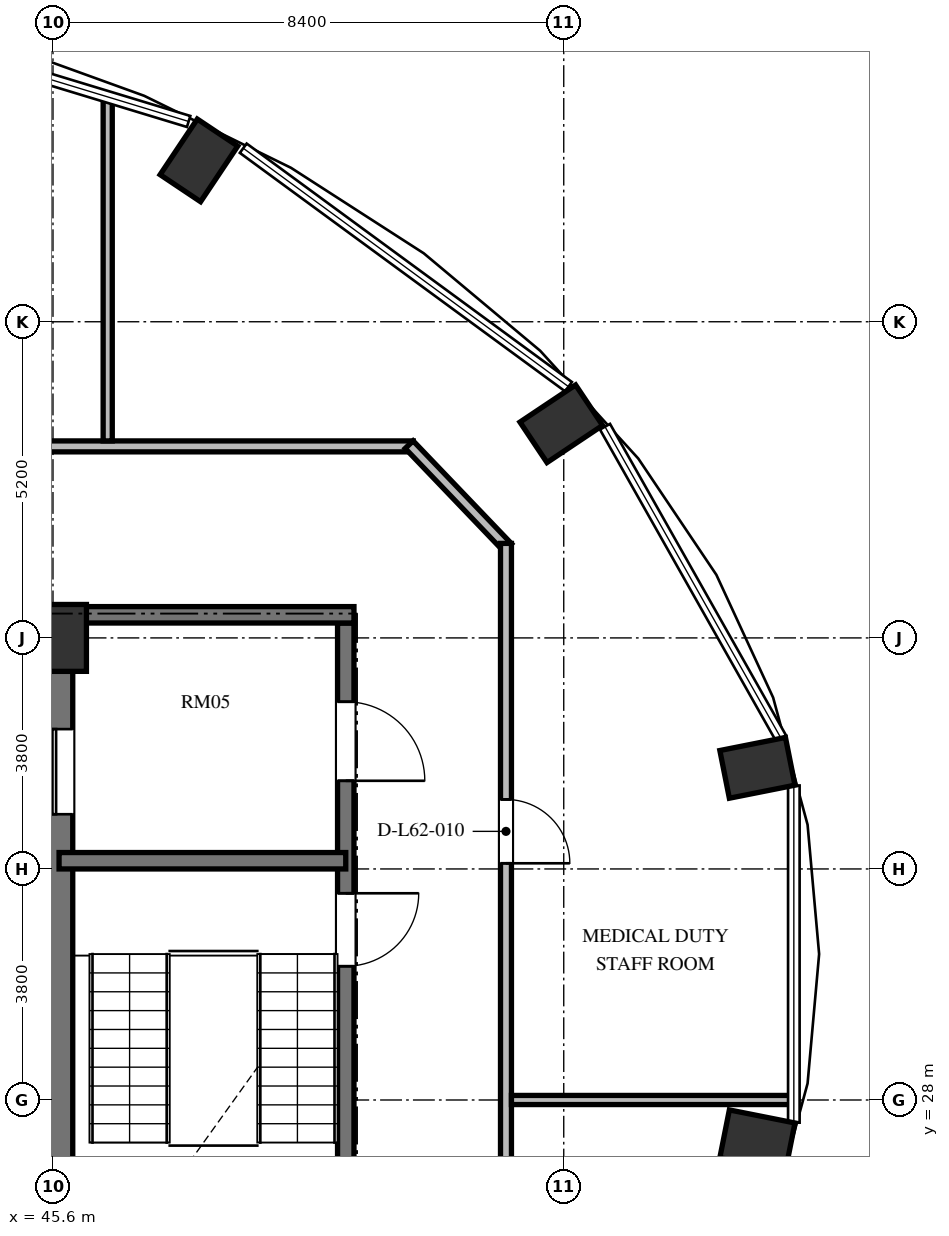
"""IFC4 building model, lengths in metres.
Left out: names, types, materials, properties, quantities, classifications, styles, units other than length and angle.
Written with IfcOpenShell. Run it as: python <this file> out.ifc"""

import sys

from ifc_helpers import new_model, si_unit, direction, frame, frame_2d, origin, origin_2d, place, context, subcontext, project, spatial, rectangle, extrude, element, fill, save


model = new_model("IFC4")
c1 = context("Model", 3, precision=1e-05, world=origin(), true_north=direction((0.0, 1.0)))
c2 = subcontext(c1, "Body", "Model", "MODEL_VIEW")
j1 = project(units=[si_unit("LENGTHUNIT", "METRE"), si_unit("PLANEANGLEUNIT", "RADIAN")], contexts=[c1])
p1 = place(None, origin())
s1 = spatial("IfcSite", under=j1, at=p1, CompositionType="ELEMENT")
p2 = place(p1, origin())
s2 = spatial("IfcBuilding", under=s1, at=p2, CompositionType="ELEMENT")
p3 = place(p2, frame((0.0, 0.0, 238.608)))
s3 = spatial("IfcBuildingStorey", under=s2, at=p3, CompositionType="ELEMENT", Elevation=238.608)
for number, where, z_axis, x_axis in (
    (1, (57.185, 27.337, 0.0), (0.0, 0.0, 1.0), (0.981, -0.195, 0.0)),
    (2, (57.185, 33.463, 0.0), (0.0, 0.0, 1.0), (0.981, 0.195, 0.0)),
    (3, (53.96, 39.123, 0.0), (0.0, 0.0, 1.0), (0.831, 0.556, 0.0)),
    (4, (48.0, 43.454, 0.0), (0.0, 0.0, 1.0), (0.556, 0.831, 0.0)),
):
    element("IfcColumn", number, at=place(p3, frame(where, z_axis=z_axis, x_axis=x_axis)), inside=s3, PredefinedType="COLUMN", context=c2, shape_type="SweptSolid", body=[
        extrude(rectangle(XDim=1.1, YDim=0.8, at=origin_2d()), origin(), (0.0, 0.0, 1.0), 3.648),
    ])
p4 = place(p3, frame((45.6, 35.6, 0.0), z_axis=(0.0, 0.0, 1.0), x_axis=(1.0, 0.0, 0.0)))
e5 = element("IfcColumn", 5, at=p4, inside=s3, PredefinedType="COLUMN", context=c2, shape_type="SweptSolid", body=[
    extrude(rectangle(XDim=1.1, YDim=1.1, at=origin_2d()), origin(), (0.0, 0.0, 1.0), 3.648),
])
p5 = place(p3, frame((45.7, 20.95, 0.0), z_axis=(0.0, 0.0, 1.0), x_axis=(0.0, 1.0, 0.0)))
e6 = element("IfcWall", 6, at=p5, inside=s3, PredefinedType="SHEAR", context=c2, shape_type="SweptSolid", body=[
    extrude(rectangle(XDim=14.1, YDim=0.45, at=frame_2d((7.05, 0.0))), origin(), (0.0, 0.0, 1.0), 3.648),
])
p6 = place(p5, frame((11.75, 0.0, 0.0)))
e7 = element("IfcOpeningElement", 7, at=p6, cuts=e6, PredefinedType="OPENING", context=c2, shape_type="SweptSolid", body=[
    extrude(rectangle(XDim=1.4, YDim=2.3, at=frame_2d((0.7, 1.15))), frame((0.0, 0.235, 0.0), z_axis=(0.0, -1.0, 0.0), x_axis=(1.0, 0.0, 0.0)), (0.0, 0.0, 1.0), 0.47),
])
p7 = place(p5, frame((0.95, 0.0, 0.0)))
e8 = element("IfcOpeningElement", 8, at=p7, cuts=e6, PredefinedType="OPENING", context=c2, shape_type="SweptSolid", body=[
    extrude(rectangle(XDim=1.4, YDim=2.3, at=frame_2d((0.7, 1.15))), frame((0.0, 0.235, 0.0), z_axis=(0.0, -1.0, 0.0), x_axis=(1.0, 0.0, 0.0)), (0.0, 0.0, 1.0), 0.47),
])
p8 = place(p3, frame((50.415, 35.845, 0.0), z_axis=(0.0, 0.0, 1.0), x_axis=(0.0, -1.0, 0.0)))
e9 = element("IfcWall", 9, at=p8, inside=s3, PredefinedType="SHEAR", context=c2, shape_type="SweptSolid", body=[
    extrude(rectangle(XDim=15.825, YDim=0.27, at=frame_2d((7.913, 0.0))), origin(), (0.0, 0.0, 1.0), 3.648),
])
p9 = place(p8, frame((4.445, 0.0, 0.0)))
e10 = element("IfcOpeningElement", 10, at=p9, cuts=e9, PredefinedType="OPENING", context=c2, shape_type="SweptSolid", body=[
    extrude(rectangle(XDim=1.2, YDim=2.15, at=frame_2d((0.6, 1.075))), frame((0.0, 0.145, 0.0), z_axis=(0.0, -1.0, 0.0), x_axis=(1.0, 0.0, 0.0)), (0.0, 0.0, 1.0), 0.29),
])
p10 = place(p8, frame((1.295, 0.0, 0.0)))
e11 = element("IfcOpeningElement", 11, at=p10, cuts=e9, PredefinedType="OPENING", context=c2, shape_type="SweptSolid", body=[
    extrude(rectangle(XDim=1.3, YDim=2.2, at=frame_2d((0.65, 1.1))), frame((0.0, 0.145, 0.0), z_axis=(0.0, -1.0, 0.0), x_axis=(1.0, 0.0, 0.0)), (0.0, 0.0, 1.0), 0.29),
])
p11 = place(p8, frame((13.095, 0.0, 0.0)))
e12 = element("IfcOpeningElement", 12, at=p11, cuts=e9, PredefinedType="OPENING", context=c2, shape_type="SweptSolid", body=[
    extrude(rectangle(XDim=1.3, YDim=2.2, at=frame_2d((0.65, 1.1))), frame((0.0, 0.145, 0.0), z_axis=(0.0, -1.0, 0.0), x_axis=(1.0, 0.0, 0.0)), (0.0, 0.0, 1.0), 0.29),
])
p12 = place(p3, frame((45.925, 35.98, 0.0), z_axis=(0.0, 0.0, 1.0), x_axis=(1.0, 0.0, 0.0)))
e13 = element("IfcWall", 13, at=p12, inside=s3, PredefinedType="SHEAR", context=c2, shape_type="SweptSolid", body=[
    extrude(rectangle(XDim=4.625, YDim=0.27, at=frame_2d((2.312, 0.0))), origin(), (0.0, 0.0, 1.0), 3.648),
])
p13 = place(p3, frame((45.7, 31.935, 0.0), z_axis=(0.0, 0.0, 1.0), x_axis=(1.0, 0.0, 0.0)))
e14 = element("IfcWall", 14, at=p13, inside=s3, PredefinedType="SHEAR", context=c2, shape_type="SweptSolid", body=[
    extrude(rectangle(XDim=4.715, YDim=0.27, at=frame_2d((2.357, 0.0))), origin(), (0.0, 0.0, 1.0), 3.648),
])
p14 = place(p3, frame((30.71, 38.75, 0.0), z_axis=(0.0, 0.0, 1.0), x_axis=(1.0, 0.0, 0.0)))
e15 = element("IfcWall", 15, at=p14, inside=s3, PredefinedType="PARTITIONING", context=c2, shape_type="SweptSolid", body=[
    extrude(rectangle(XDim=20.815, YDim=0.18, at=frame_2d((10.408, 0.0))), origin(), (0.0, 0.0, 1.0), 3.073),
])
p15 = place(p14, frame((11.515, 0.0, 0.0)))
e16 = element("IfcOpeningElement", 16, at=p15, cuts=e15, PredefinedType="OPENING", context=c2, shape_type="SweptSolid", body=[
    extrude(rectangle(XDim=1.05, YDim=2.15, at=frame_2d((0.525, 1.075))), frame((0.0, 0.1, 0.0), z_axis=(0.0, -1.0, 0.0), x_axis=(1.0, 0.0, 0.0)), (0.0, 0.0, 1.0), 0.2),
])
p16 = place(p14, frame((3.779, 0.0, 0.0)))
e17 = element("IfcOpeningElement", 17, at=p16, cuts=e15, PredefinedType="OPENING", context=c2, shape_type="SweptSolid", body=[
    extrude(rectangle(XDim=1.05, YDim=2.15, at=frame_2d((0.525, 1.075))), frame((0.0, 0.1, 0.0), z_axis=(0.0, -1.0, 0.0), x_axis=(1.0, 0.0, 0.0)), (0.0, 0.0, 1.0), 0.2),
])
p17 = place(p3, frame((51.458, 38.779, 0.0), z_axis=(0.0, 0.0, 1.0), x_axis=(0.691359830363, -0.722510612352, 0.0)))
e18 = element("IfcWall", 18, at=p17, inside=s3, PredefinedType="PARTITIONING", context=c2, shape_type="SweptSolid", body=[
    extrude(rectangle(XDim=2.343, YDim=0.18, at=frame_2d((1.172, 0.0))), origin(), (0.0, 0.0, 1.0), 3.033),
])
p18 = place(p3, frame((53.05, 37.155, 0.0), z_axis=(0.0, 0.0, 1.0), x_axis=(0.0, -1.0, 0.0)))
e19 = element("IfcWall", 19, at=p18, inside=s3, PredefinedType="PARTITIONING", context=c2, shape_type="SweptSolid", body=[
    extrude(rectangle(XDim=13.509, YDim=0.18, at=frame_2d((6.754, 0.0))), origin(), (0.0, 0.0, 1.0), 3.448),
])
p19 = place(p18, frame((4.211, 0.0, 0.0)))
e20 = element("IfcOpeningElement", 20, at=p19, cuts=e19, PredefinedType="OPENING", context=c2, shape_type="SweptSolid", body=[
    extrude(rectangle(XDim=1.05, YDim=2.15, at=frame_2d((0.525, 1.075))), frame((0.0, 0.1, 0.0), z_axis=(0.0, -1.0, 0.0), x_axis=(1.0, 0.0, 0.0)), (0.0, 0.0, 1.0), 0.2),
])
p20 = place(p3, frame((53.14, 28.0, 0.0), z_axis=(0.0, 0.0, 1.0), x_axis=(1.0, 0.0, 0.0)))
e21 = element("IfcWall", 21, at=p20, inside=s3, PredefinedType="PARTITIONING", context=c2, shape_type="SweptSolid", body=[
    extrude(rectangle(XDim=4.632, YDim=0.15, at=frame_2d((2.316, 0.0))), origin(), (0.0, 0.0, 1.0), 3.448),
])
p21 = place(p3, frame((46.5, 38.84, 0.0), z_axis=(0.0, 0.0, 1.0), x_axis=(0.0, 1.0, 0.0)))
e22 = element("IfcWall", 22, at=p21, inside=s3, PredefinedType="PARTITIONING", context=c2, shape_type="SweptSolid", body=[
    extrude(rectangle(XDim=5.641, YDim=0.15, at=frame_2d((2.821, 0.0))), origin(), (0.0, 0.0, 1.0), 3.448),
])
p22 = place(p6, origin())
e23 = element("IfcDoor", 23, at=p22, inside=s3, OperationType="SLIDING_TO_LEFT", PredefinedType="DOOR", context=c2, shape_type="SweptSolid", body=[
    extrude(rectangle(XDim=1.4, YDim=2.3, at=frame_2d((0.7, 1.15))), frame((0.0, 0.025, 0.0), z_axis=(0.0, -1.0, 0.0), x_axis=(1.0, 0.0, 0.0)), (0.0, 0.0, 1.0), 0.05),
])
fill(e7, e23)
p23 = place(p9, origin())
e24 = element("IfcDoor", 24, at=p23, inside=s3, OperationType="SINGLE_SWING_LEFT", PredefinedType="DOOR", context=c2, shape_type="SweptSolid", body=[
    extrude(rectangle(XDim=1.2, YDim=2.15, at=frame_2d((0.6, 1.075))), frame((0.0, 0.025, 0.0), z_axis=(0.0, -1.0, 0.0), x_axis=(1.0, 0.0, 0.0)), (0.0, 0.0, 1.0), 0.05),
])
fill(e10, e24)
p24 = place(p10, origin())
e25 = element("IfcDoor", 25, at=p24, inside=s3, OperationType="SINGLE_SWING_RIGHT", PredefinedType="DOOR", context=c2, shape_type="SweptSolid", body=[
    extrude(rectangle(XDim=1.3, YDim=2.2, at=frame_2d((0.65, 1.1))), frame((0.0, 0.025, 0.0), z_axis=(0.0, -1.0, 0.0), x_axis=(1.0, 0.0, 0.0)), (0.0, 0.0, 1.0), 0.05),
])
fill(e11, e25)
p25 = place(p19, origin())
e26 = element("IfcDoor", 26, at=p25, inside=s3, OperationType="SINGLE_SWING_RIGHT", PredefinedType="DOOR", context=c2, shape_type="SweptSolid", body=[
    extrude(rectangle(XDim=1.05, YDim=2.15, at=frame_2d((0.525, 1.075))), frame((0.0, 0.025, 0.0), z_axis=(0.0, -1.0, 0.0), x_axis=(1.0, 0.0, 0.0)), (0.0, 0.0, 1.0), 0.05),
])
fill(e20, e26)
save(model, sys.argv[1])
